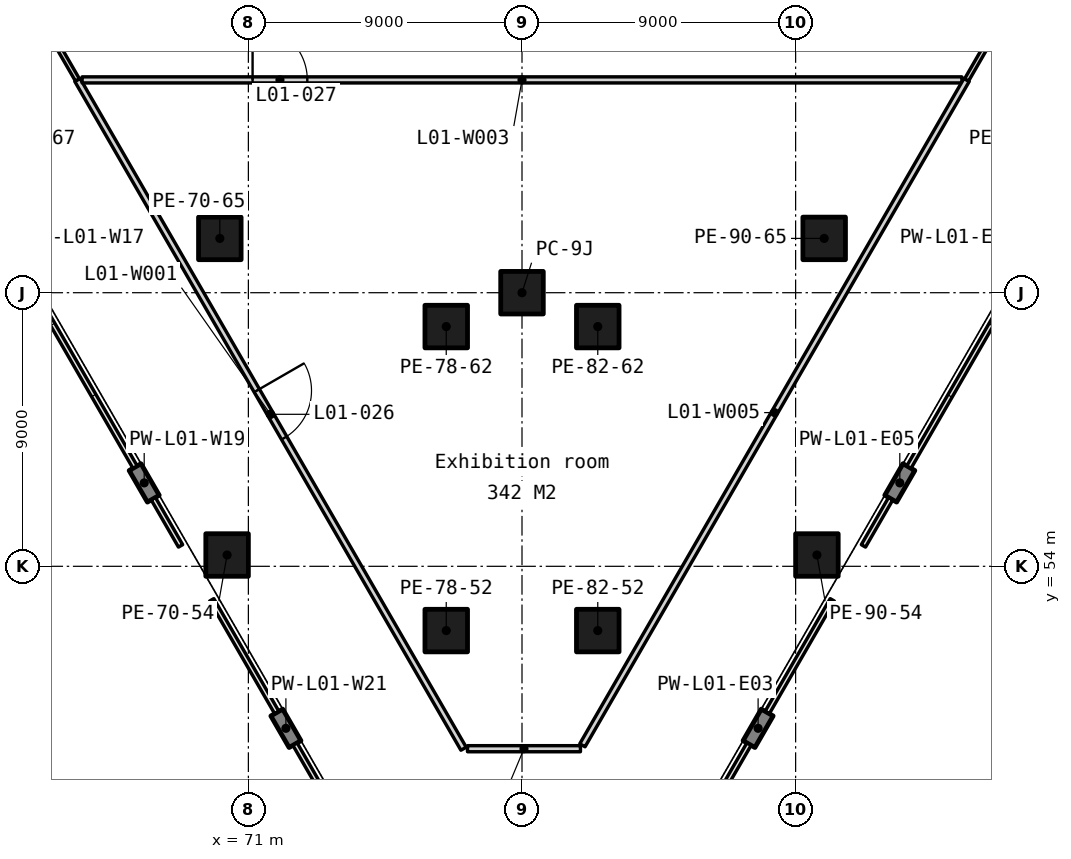
"""IFC4 building model, lengths in metres.
Left out: names, types, materials, properties, quantities, classifications, styles, units other than length and angle.
Written with IfcOpenShell. Run it as: python <this file> out.ifc"""

import sys

from ifc_helpers import new_model, si_unit, direction, frame, frame_2d, origin, origin_2d, place, context, subcontext, project, spatial, rectangle, extrude, element, fill, save


model = new_model("IFC4")
c1 = context("Model", 3, precision=1e-05, world=origin(), true_north=direction((0.0, 1.0)))
c2 = subcontext(c1, "Body", "Model", "MODEL_VIEW")
j1 = project(units=[si_unit("LENGTHUNIT", "METRE"), si_unit("PLANEANGLEUNIT", "RADIAN")], contexts=[c1])
p1 = place(None, origin())
s1 = spatial("IfcSite", under=j1, at=p1, CompositionType="ELEMENT")
p2 = place(p1, origin())
s2 = spatial("IfcBuilding", under=s1, at=p2, CompositionType="ELEMENT")
p3 = place(p2, frame((0.0, 0.0, 7.5)))
s3 = spatial("IfcBuildingStorey", under=s2, at=p3, CompositionType="ELEMENT", Elevation=7.5)
for number, where, z_axis, x_axis in (
    (1, (80.0, 63.0, 0.0), (0.0, 0.0, 1.0), (1.0, 0.0, 0.0)),
    (2, (70.3, 54.372, 0.0), (0.0, 0.0, 1.0), (1.0, 0.0, 0.0)),
    (3, (70.061, 64.786, 0.0), (0.0, 0.0, 1.0), (1.0, 0.0, 0.0)),
    (4, (77.508, 51.886, 0.0), (0.0, 0.0, 1.0), (1.0, 0.0, 0.0)),
    (5, (77.508, 61.886, 0.0), (0.0, 0.0, 1.0), (1.0, 0.0, 0.0)),
    (6, (82.492, 51.886, 0.0), (0.0, 0.0, 1.0), (1.0, 0.0, 0.0)),
    (7, (82.492, 61.886, 0.0), (0.0, 0.0, 1.0), (1.0, 0.0, 0.0)),
    (8, (89.7, 54.372, 0.0), (0.0, 0.0, 1.0), (1.0, 0.0, 0.0)),
    (9, (89.939, 64.786, 0.0), (0.0, 0.0, 1.0), (1.0, 0.0, 0.0)),
):
    element("IfcColumn", number, at=place(p3, frame(where, z_axis=z_axis, x_axis=x_axis)), inside=s3, PredefinedType="COLUMN", context=c2, shape_type="SweptSolid", body=[
        extrude(rectangle(XDim=1.4, YDim=1.4, at=origin_2d()), origin(), (0.0, 0.0, 1.0), 6.0),
    ])
p4 = place(p3, frame((67.273, 57.263, -0.3), z_axis=(0.0, 0.0, 1.0), x_axis=(0.50012165622, -0.865955154139, 0.0)))
e10 = element("IfcWall", 10, at=p4, inside=s3, PredefinedType="SOLIDWALL", context=c2, shape_type="SweptSolid", body=[
    extrude(rectangle(XDim=1.2, YDim=0.45, at=frame_2d((0.6, 0.0))), origin(), (0.0, 0.0, 1.0), 5.312),
])
for number, where, z_axis, x_axis in (
    (11, (71.934, 49.191, -0.3), (0.0, 0.0, 1.0), (0.5, -0.866, 0.0)),
    (12, (87.466, 48.152, -0.3), (0.0, 0.0, 1.0), (0.5, 0.866, 0.0)),
):
    element("IfcWall", number, at=place(p3, frame(where, z_axis=z_axis, x_axis=x_axis)), inside=s3, PredefinedType="SOLIDWALL", context=c2, shape_type="SweptSolid", body=[
        extrude(rectangle(XDim=1.2, YDim=0.45, at=frame_2d((0.6, 0.0))), origin(), (0.0, 0.0, 1.0), 5.312),
    ])
p5 = place(p3, frame((92.126, 56.224, -0.3), z_axis=(0.0, 0.0, 1.0), x_axis=(0.50012165622, 0.865955154139, 0.0)))
e13 = element("IfcWall", 13, at=p5, inside=s3, PredefinedType="SOLIDWALL", context=c2, shape_type="SweptSolid", body=[
    extrude(rectangle(XDim=1.2, YDim=0.45, at=frame_2d((0.6, 0.0))), origin(), (0.0, 0.0, 1.0), 5.312),
])
p6 = place(p3, frame((65.376, 70.0, 0.0), z_axis=(0.0, 0.0, 1.0), x_axis=(0.499998648824, -0.866026183885, 0.0)))
e14 = element("IfcWall", 14, at=p6, inside=s3, PredefinedType="PARTITIONING", context=c2, shape_type="SweptSolid", body=[
    extrude(rectangle(XDim=25.403, YDim=0.2, at=frame_2d((12.702, 0.0))), origin(), (0.0, 0.0, 1.0), 5.7),
])
p7 = place(p6, frame((11.802, 0.0, 0.0)))
e15 = element("IfcOpeningElement", 15, at=p7, cuts=e14, PredefinedType="OPENING", context=c2, shape_type="SweptSolid", body=[
    extrude(rectangle(XDim=1.8, YDim=2.1, at=frame_2d((0.9, 1.05))), frame((0.0, 0.11, 0.0), z_axis=(0.0, -1.0, 0.0), x_axis=(1.0, 0.0, 0.0)), (0.0, 0.0, 1.0), 0.22),
])
p8 = place(p3, frame((78.208, 48.0, 0.0), z_axis=(0.0, 0.0, 1.0), x_axis=(1.0, 0.0, 0.0)))
e16 = element("IfcWall", 16, at=p8, inside=s3, PredefinedType="PARTITIONING", context=c2, shape_type="SweptSolid", body=[
    extrude(rectangle(XDim=3.715, YDim=0.2, at=frame_2d((1.857, 0.0))), origin(), (0.0, 0.0, 1.0), 5.7),
])
p9 = place(p3, frame((65.531, 70.0, 0.0), z_axis=(0.0, 0.0, 1.0), x_axis=(1.0, 0.0, 0.0)))
e17 = element("IfcWall", 17, at=p9, inside=s3, PredefinedType="PARTITIONING", context=c2, shape_type="SweptSolid", body=[
    extrude(rectangle(XDim=28.938, YDim=0.2, at=frame_2d((14.469, 0.0))), origin(), (0.0, 0.0, 1.0), 5.7),
])
p10 = place(p9, frame((5.608, 0.0, 0.0)))
e18 = element("IfcOpeningElement", 18, at=p10, cuts=e17, PredefinedType="OPENING", context=c2, shape_type="SweptSolid", body=[
    extrude(rectangle(XDim=1.8, YDim=2.1, at=frame_2d((0.9, 1.05))), frame((0.0, 0.11, 0.0), z_axis=(0.0, -1.0, 0.0), x_axis=(1.0, 0.0, 0.0)), (0.0, 0.0, 1.0), 0.22),
])
p11 = place(p3, frame((42.282, 110.0, 0.0), z_axis=(0.0, 0.0, 1.0), x_axis=(0.499999730012, -0.866025559662, 0.0)))
e19 = element("IfcWall", 19, at=p11, inside=s3, PredefinedType="PARTITIONING", context=c2, shape_type="SweptSolid", body=[
    extrude(rectangle(XDim=46.188, YDim=0.15, at=frame_2d((23.094, 0.0))), origin(), (0.0, 0.0, 1.0), 5.7),
])
p12 = place(p11, frame((24.383, 0.0, 0.0)))
e20 = element("IfcOpeningElement", 20, at=p12, cuts=e19, PredefinedType="OPENING", context=c2, shape_type="SweptSolid", body=[
    extrude(rectangle(XDim=1.8, YDim=2.1, at=frame_2d((0.9, 1.05))), frame((0.0, 0.085, 0.0), z_axis=(0.0, -1.0, 0.0), x_axis=(1.0, 0.0, 0.0)), (0.0, 0.0, 1.0), 0.17),
])
p13 = place(p3, frame((81.987, 48.113, 0.0), z_axis=(0.0, 0.0, 1.0), x_axis=(0.499999790018, 0.866025525018, 0.0)))
e21 = element("IfcWall", 21, at=p13, inside=s3, PredefinedType="PARTITIONING", context=c2, shape_type="SweptSolid", body=[
    extrude(rectangle(XDim=25.273, YDim=0.2, at=frame_2d((12.637, 0.0))), origin(), (0.0, 0.0, 1.0), 5.7),
])
p14 = place(p3, frame((94.624, 70.0, 0.0), z_axis=(0.0, 0.0, 1.0), x_axis=(0.499999730012, 0.866025559662, 0.0)))
e22 = element("IfcWall", 22, at=p14, inside=s3, PredefinedType="PARTITIONING", context=c2, shape_type="SweptSolid", body=[
    extrude(rectangle(XDim=46.188, YDim=0.15, at=frame_2d((23.094, 0.0))), origin(), (0.0, 0.0, 1.0), 5.7),
])
p15 = place(p14, frame((9.058, 0.0, 0.0)))
e23 = element("IfcOpeningElement", 23, at=p15, cuts=e22, PredefinedType="OPENING", context=c2, shape_type="SweptSolid", body=[
    extrude(rectangle(XDim=1.8, YDim=2.1, at=frame_2d((0.9, 1.05))), frame((0.0, 0.085, 0.0), z_axis=(0.0, -1.0, 0.0), x_axis=(1.0, 0.0, 0.0)), (0.0, 0.0, 1.0), 0.17),
])
p16 = place(p7, origin())
e24 = element("IfcDoor", 24, at=p16, inside=s3, OperationType="SINGLE_SWING_LEFT", PredefinedType="DOOR", context=c2, shape_type="SweptSolid", body=[
    extrude(rectangle(XDim=1.8, YDim=2.1, at=frame_2d((0.9, 1.05))), frame((0.0, 0.025, 0.0), z_axis=(0.0, -1.0, 0.0), x_axis=(1.0, 0.0, 0.0)), (0.0, 0.0, 1.0), 0.05),
])
fill(e15, e24)
p17 = place(p10, origin())
e25 = element("IfcDoor", 25, at=p17, inside=s3, OperationType="SINGLE_SWING_LEFT", PredefinedType="DOOR", context=c2, shape_type="SweptSolid", body=[
    extrude(rectangle(XDim=1.8, YDim=2.1, at=frame_2d((0.9, 1.05))), frame((0.0, 0.025, 0.0), z_axis=(0.0, -1.0, 0.0), x_axis=(1.0, 0.0, 0.0)), (0.0, 0.0, 1.0), 0.05),
])
fill(e18, e25)
save(model, sys.argv[1])
